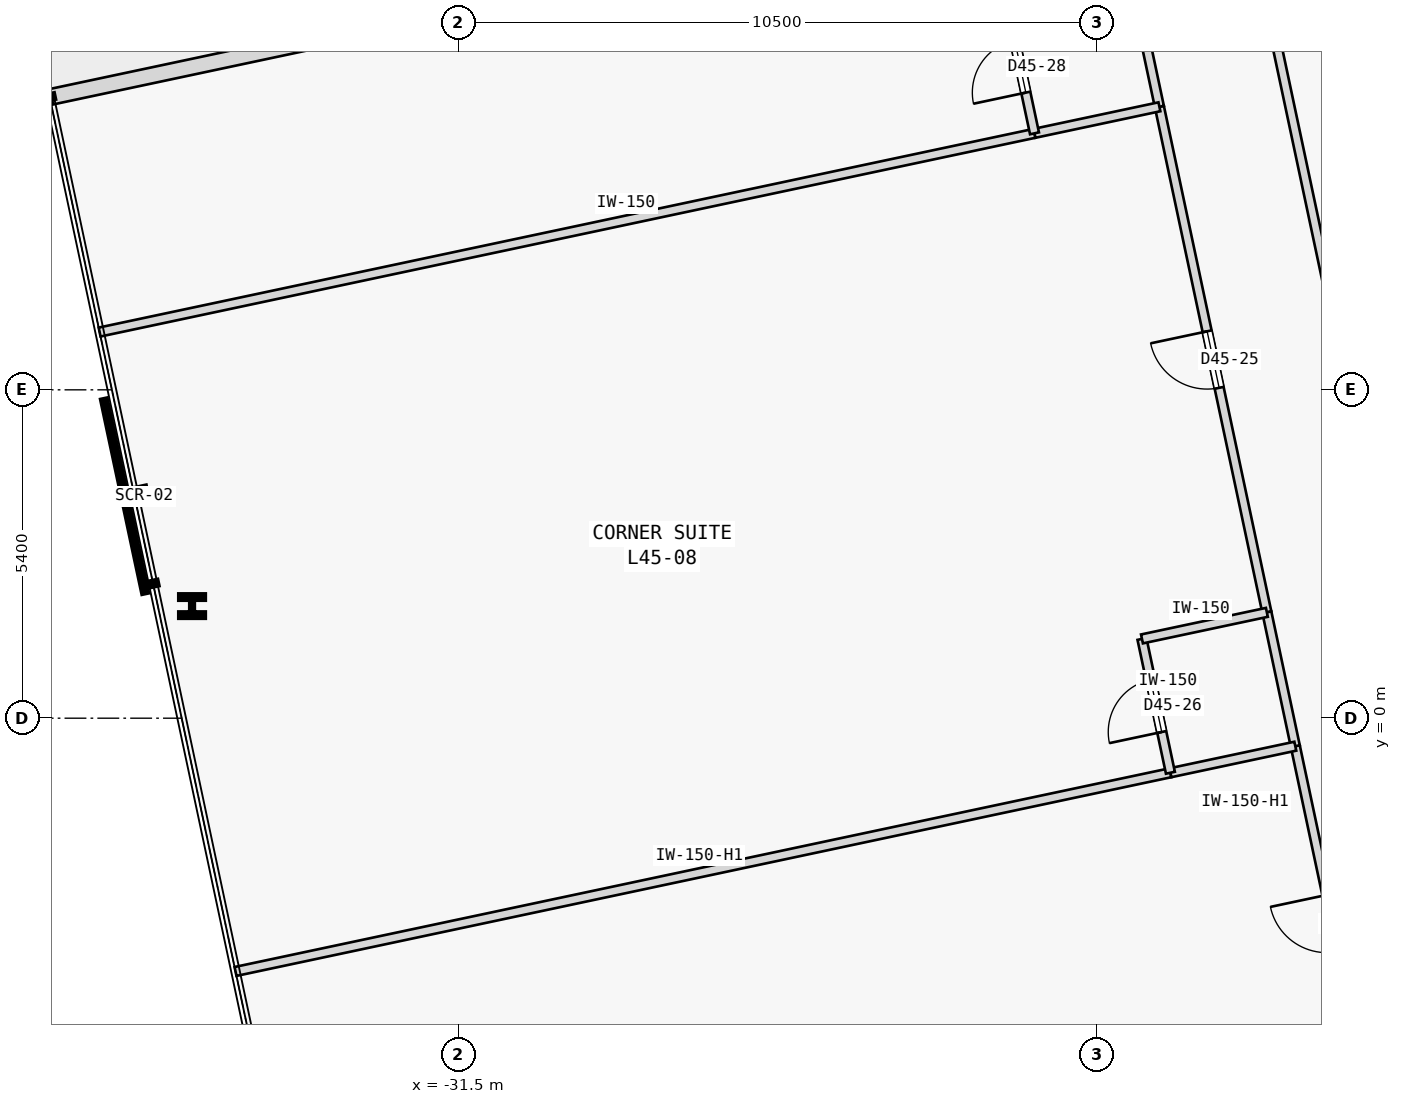
"""IFC4 building model, lengths in metres.
Left out: names, types, materials, properties, quantities, classifications, styles, units other than length and angle.
Written with IfcOpenShell. Run it as: python <this file> out.ifc"""

import sys

from ifc_helpers import new_model, si_unit, direction, frame, frame_2d, origin, origin_2d, place, context, subcontext, project, spatial, rectangle, i_section, extrude, element, fill, save


model = new_model("IFC4")
c1 = context("Model", 3, precision=1e-05, world=origin(), true_north=direction((0.0, 1.0)))
c2 = subcontext(c1, "Body", "Model", "MODEL_VIEW")
j1 = project(units=[si_unit("LENGTHUNIT", "METRE"), si_unit("PLANEANGLEUNIT", "RADIAN")], contexts=[c1])
p1 = place(None, origin())
s1 = spatial("IfcSite", under=j1, at=p1, CompositionType="ELEMENT")
p2 = place(p1, origin())
s2 = spatial("IfcBuilding", under=s1, at=p2, CompositionType="ELEMENT")
p3 = place(p2, frame((0.0, 0.0, 175.2)))
s3 = spatial("IfcBuildingStorey", under=s2, at=p3, CompositionType="ELEMENT", Elevation=175.2)
p4 = place(p3, frame((-35.883, 1.844, 0.0), z_axis=(0.0, 0.0, 1.0), x_axis=(1.0, 0.0, 0.0)))
e1 = element("IfcColumn", 1, at=p4, inside=s3, PredefinedType="COLUMN", context=c2, shape_type="SweptSolid", body=[
    extrude(i_section(OverallWidth=0.409, OverallDepth=0.374, WebThickness=0.048, FlangeThickness=0.077, FilletRadius=0.015, at=origin_2d()), origin(), (0.0, 0.0, 1.0), 3.4),
])
p5 = place(p3, frame((-27.494, 12.495, 0.0), z_axis=(0.0, 0.0, 1.0), x_axis=(-0.978145633983, -0.207920943438, 0.0)))
e2 = element("IfcWall", 2, at=p5, inside=s3, PredefinedType="STANDARD", context=c2, shape_type="SweptSolid", body=[
    extrude(rectangle(XDim=10.94, YDim=0.26, at=frame_2d((5.47, 0.0))), origin(), (0.0, 0.0, 1.0), 3.175),
])
p6 = place(p5, frame((4.57, 0.0, 0.8)))
e3 = element("IfcOpeningElement", 3, at=p6, cuts=e2, PredefinedType="OPENING", context=c2, shape_type="SweptSolid", body=[
    extrude(rectangle(XDim=1.8, YDim=1.8, at=frame_2d((0.9, 0.9))), frame((0.0, 0.14, 0.0), z_axis=(0.0, -1.0, 0.0), x_axis=(1.0, 0.0, 0.0)), (0.0, 0.0, 1.0), 0.28),
])
p7 = place(p3, frame((-17.162, 6.926, 0.0), z_axis=(0.0, 0.0, 1.0), x_axis=(-0.207911421929, 0.978147657888, 0.0)))
e4 = element("IfcWall", 4, at=p7, inside=s3, PredefinedType="PARTITIONING", context=c2, shape_type="SweptSolid", body=[
    extrude(rectangle(XDim=13.195, YDim=0.15, at=frame_2d((6.598, 0.0))), origin(), (0.0, 0.0, 1.0), 2.725),
])
p8 = place(p7, frame((6.137, 0.0, 0.0)))
e5 = element("IfcOpeningElement", 5, at=p8, cuts=e4, PredefinedType="OPENING", context=c2, shape_type="SweptSolid", body=[
    extrude(rectangle(XDim=0.92, YDim=2.15, at=frame_2d((0.46, 1.075))), frame((0.0, 0.085, 0.0), z_axis=(0.0, -1.0, 0.0), x_axis=(1.0, 0.0, 0.0)), (0.0, 0.0, 1.0), 0.17),
])
p9 = place(p3, frame((-15.972, -8.775, 0.0), z_axis=(0.0, 0.0, 1.0), x_axis=(-0.207894825434, 0.97815118543, 0.0)))
e6 = element("IfcWall", 6, at=p9, inside=s3, PredefinedType="PARTITIONING", context=c2, shape_type="SweptSolid", body=[
    extrude(rectangle(XDim=8.5, YDim=0.15, at=frame_2d((4.25, 0.0))), origin(), (0.0, 0.0, 1.0), 3.175),
])
p10 = place(p9, frame((5.05, 0.0, 0.0)))
e7 = element("IfcOpeningElement", 7, at=p10, cuts=e6, PredefinedType="OPENING", context=c2, shape_type="SweptSolid", body=[
    extrude(rectangle(XDim=0.95, YDim=2.15, at=frame_2d((0.475, 1.075))), frame((0.0, 0.085, 0.0), z_axis=(0.0, -1.0, 0.0), x_axis=(1.0, 0.0, 0.0)), (0.0, 0.0, 1.0), 0.17),
])
p11 = place(p3, frame((-18.207, 1.74, 0.0), z_axis=(0.0, 0.0, 1.0), x_axis=(-0.207922306475, 0.978145344246, 0.0)))
e8 = element("IfcWall", 8, at=p11, inside=s3, PredefinedType="PARTITIONING", context=c2, shape_type="SweptSolid", body=[
    extrude(rectangle(XDim=8.5, YDim=0.15, at=frame_2d((4.25, 0.0))), origin(), (0.0, 0.0, 1.0), 3.175),
])
p12 = place(p11, frame((3.775, 0.0, 0.0)))
e9 = element("IfcOpeningElement", 9, at=p12, cuts=e8, PredefinedType="OPENING", context=c2, shape_type="SweptSolid", body=[
    extrude(rectangle(XDim=0.95, YDim=2.15, at=frame_2d((0.475, 1.075))), frame((0.0, 0.085, 0.0), z_axis=(0.0, -1.0, 0.0), x_axis=(1.0, 0.0, 0.0)), (0.0, 0.0, 1.0), 0.17),
])
p13 = place(p3, frame((-17.739, -0.46, 0.0), z_axis=(0.0, 0.0, 1.0), x_axis=(-0.207891197838, 0.978151956427, 0.0)))
e10 = element("IfcWall", 10, at=p13, inside=s3, PredefinedType="PARTITIONING", context=c2, shape_type="SweptSolid", body=[
    extrude(rectangle(XDim=2.25, YDim=0.15, at=frame_2d((1.125, 0.0))), origin(), (0.0, 0.0, 1.0), 3.175),
])
p14 = place(p3, frame((-19.974, 10.055, 0.0), z_axis=(0.0, 0.0, 1.0), x_axis=(-0.207913264065, 0.978147266328, 0.0)))
e11 = element("IfcWall", 11, at=p14, inside=s3, PredefinedType="PARTITIONING", context=c2, shape_type="SweptSolid", body=[
    extrude(rectangle(XDim=2.25, YDim=0.15, at=frame_2d((1.125, 0.0))), origin(), (0.0, 0.0, 1.0), 3.175),
])
p15 = place(p3, frame((-35.168, -4.165, 0.0), z_axis=(0.0, 0.0, 1.0), x_axis=(0.978149296727, 0.207903711638, 0.0)))
e12 = element("IfcWall", 12, at=p15, inside=s3, PredefinedType="PARTITIONING", context=c2, shape_type="SweptSolid", body=[
    extrude(rectangle(XDim=15.718, YDim=0.15, at=frame_2d((7.859, 0.0))), origin(), (0.0, 0.0, 1.0), 2.725),
])
p16 = place(p3, frame((-19.793, -0.897, 0.0), z_axis=(0.0, 0.0, 1.0), x_axis=(0.978134617382, 0.207972763311, 0.0)))
e13 = element("IfcWall", 13, at=p16, inside=s3, PredefinedType="PARTITIONING", context=c2, shape_type="SweptSolid", body=[
    extrude(rectangle(XDim=2.1, YDim=0.15, at=frame_2d((1.05, 0.0))), origin(), (0.0, 0.0, 1.0), 2.725),
])
p17 = place(p3, frame((-19.793, -0.897, 0.0), z_axis=(0.0, 0.0, 1.0), x_axis=(-0.207891197838, 0.978151956427, 0.0)))
e14 = element("IfcWall", 14, at=p17, inside=s3, PredefinedType="PARTITIONING", context=c2, shape_type="SweptSolid", body=[
    extrude(rectangle(XDim=2.25, YDim=0.15, at=frame_2d((1.125, 0.0))), origin(), (0.0, 0.0, 1.0), 3.175),
])
p18 = place(p17, frame((0.685, 0.0, 0.0)))
e15 = element("IfcOpeningElement", 15, at=p18, cuts=e14, PredefinedType="OPENING", context=c2, shape_type="SweptSolid", body=[
    extrude(rectangle(XDim=0.88, YDim=2.15, at=frame_2d((0.44, 1.075))), frame((0.0, 0.085, 0.0), z_axis=(0.0, -1.0, 0.0), x_axis=(1.0, 0.0, 0.0)), (0.0, 0.0, 1.0), 0.17),
])
p19 = place(p3, frame((-20.261, 1.304, 0.0), z_axis=(0.0, 0.0, 1.0), x_axis=(0.978134617382, 0.207972763311, 0.0)))
e16 = element("IfcWall", 16, at=p19, inside=s3, PredefinedType="PARTITIONING", context=c2, shape_type="SweptSolid", body=[
    extrude(rectangle(XDim=2.1, YDim=0.15, at=frame_2d((1.05, 0.0))), origin(), (0.0, 0.0, 1.0), 3.175),
])
p20 = place(p3, frame((-37.403, 6.35, 0.0), z_axis=(0.0, 0.0, 1.0), x_axis=(0.978149296727, 0.207903711638, 0.0)))
e17 = element("IfcWall", 17, at=p20, inside=s3, PredefinedType="PARTITIONING", context=c2, shape_type="SweptSolid", body=[
    extrude(rectangle(XDim=15.718, YDim=0.15, at=frame_2d((7.859, 0.0))), origin(), (0.0, 0.0, 1.0), 3.175),
])
p21 = place(p3, frame((-22.029, 9.618, 0.0), z_axis=(0.0, 0.0, 1.0), x_axis=(0.978134617382, 0.207972763311, 0.0)))
e18 = element("IfcWall", 18, at=p21, inside=s3, PredefinedType="PARTITIONING", context=c2, shape_type="SweptSolid", body=[
    extrude(rectangle(XDim=2.1, YDim=0.15, at=frame_2d((1.05, 0.0))), origin(), (0.0, 0.0, 1.0), 3.175),
])
p22 = place(p3, frame((-22.029, 9.618, 0.0), z_axis=(0.0, 0.0, 1.0), x_axis=(-0.207891197838, 0.978151956427, 0.0)))
e19 = element("IfcWall", 19, at=p22, inside=s3, PredefinedType="PARTITIONING", context=c2, shape_type="SweptSolid", body=[
    extrude(rectangle(XDim=2.25, YDim=0.15, at=frame_2d((1.125, 0.0))), origin(), (0.0, 0.0, 1.0), 3.175),
])
p23 = place(p22, frame((0.685, 0.0, 0.0)))
e20 = element("IfcOpeningElement", 20, at=p23, cuts=e19, PredefinedType="OPENING", context=c2, shape_type="SweptSolid", body=[
    extrude(rectangle(XDim=0.88, YDim=2.15, at=frame_2d((0.44, 1.075))), frame((0.0, 0.085, 0.0), z_axis=(0.0, -1.0, 0.0), x_axis=(1.0, 0.0, 0.0)), (0.0, 0.0, 1.0), 0.17),
])
p24 = place(p12, origin())
e21 = element("IfcDoor", 21, at=p24, inside=s3, OperationType="SINGLE_SWING_RIGHT", PredefinedType="DOOR", context=c2, shape_type="SweptSolid", body=[
    extrude(rectangle(XDim=0.95, YDim=2.15, at=frame_2d((0.475, 1.075))), frame((0.0, 0.025, 0.0), z_axis=(0.0, -1.0, 0.0), x_axis=(1.0, 0.0, 0.0)), (0.0, 0.0, 1.0), 0.05),
])
fill(e9, e21)
p25 = place(p18, origin())
e22 = element("IfcDoor", 22, at=p25, inside=s3, OperationType="SINGLE_SWING_LEFT", PredefinedType="DOOR", context=c2, shape_type="SweptSolid", body=[
    extrude(rectangle(XDim=0.88, YDim=2.15, at=frame_2d((0.44, 1.075))), frame((0.0, 0.025, 0.0), z_axis=(0.0, -1.0, 0.0), x_axis=(1.0, 0.0, 0.0)), (0.0, 0.0, 1.0), 0.05),
])
fill(e15, e22)
p26 = place(p23, origin())
e23 = element("IfcDoor", 23, at=p26, inside=s3, OperationType="SINGLE_SWING_LEFT", PredefinedType="DOOR", context=c2, shape_type="SweptSolid", body=[
    extrude(rectangle(XDim=0.88, YDim=2.15, at=frame_2d((0.44, 1.075))), frame((0.0, 0.025, 0.0), z_axis=(0.0, -1.0, 0.0), x_axis=(1.0, 0.0, 0.0)), (0.0, 0.0, 1.0), 0.05),
])
fill(e20, e23)
save(model, sys.argv[1])
